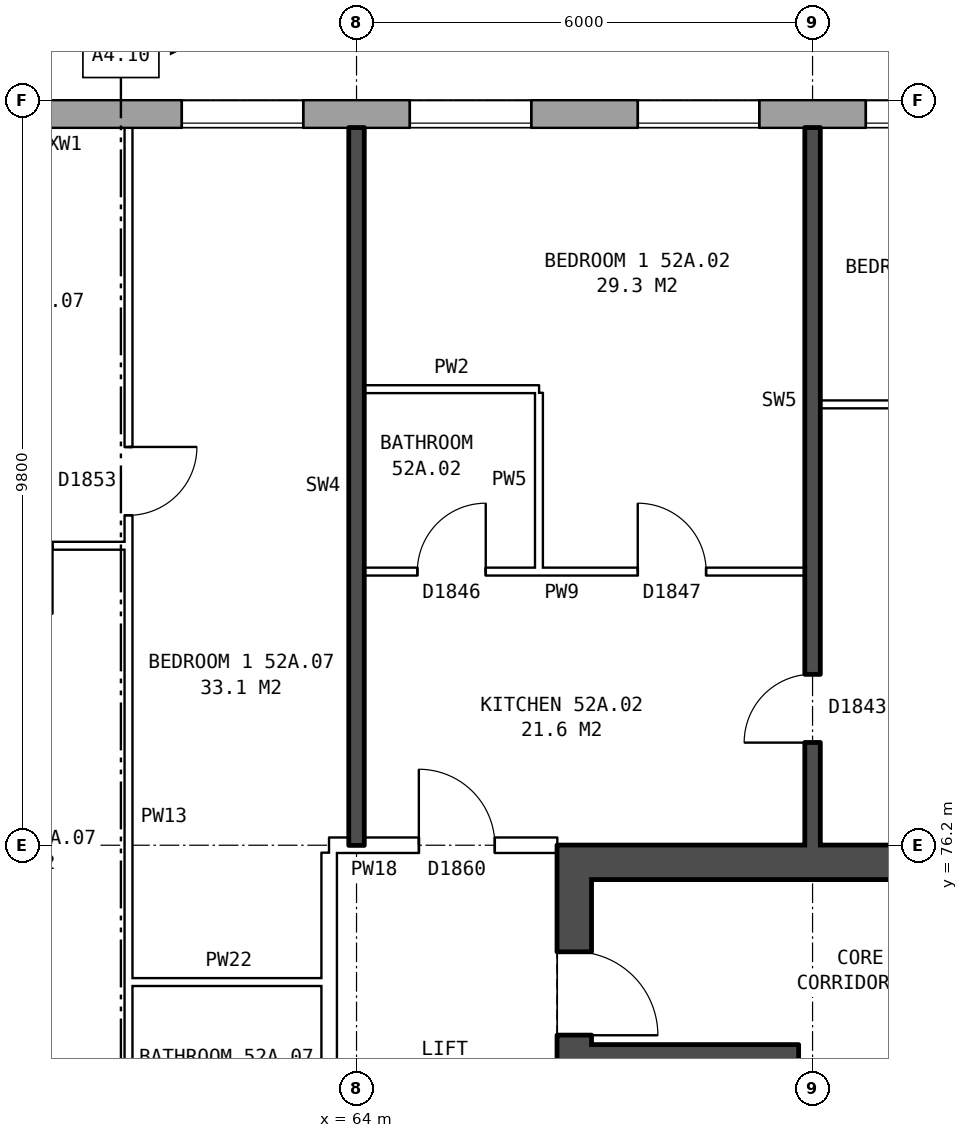
"""IFC4 building model, lengths in metres.
Left out: names, types, materials, properties, quantities, classifications, styles, units other than length and angle.
Written with IfcOpenShell. Run it as: python <this file> out.ifc"""

import sys

from ifc_helpers import new_model, si_unit, direction, frame, frame_2d, origin, place, context, subcontext, project, spatial, rectangle, extrude, element, fill, save


model = new_model("IFC4")
c1 = context("Model", 3, precision=1e-05, world=origin(), true_north=direction((0.0, 1.0)))
c2 = subcontext(c1, "Body", "Model", "MODEL_VIEW")
j1 = project(units=[si_unit("LENGTHUNIT", "METRE"), si_unit("PLANEANGLEUNIT", "RADIAN")], contexts=[c1])
p1 = place(None, origin())
s1 = spatial("IfcSite", under=j1, at=p1, CompositionType="ELEMENT")
p2 = place(p1, origin())
s2 = spatial("IfcBuilding", under=s1, at=p2, CompositionType="ELEMENT")
p3 = place(p2, frame((0.0, 0.0, 185.1)))
s3 = spatial("IfcBuildingStorey", under=s2, at=p3, CompositionType="ELEMENT", Elevation=185.1)
p4 = place(p3, frame((72.925, 85.82, 0.0), z_axis=(0.0, 0.0, 1.0), x_axis=(-1.0, 0.0, 0.0)))
e1 = element("IfcWall", 1, at=p4, inside=s3, PredefinedType="STANDARD", context=c2, shape_type="SweptSolid", body=[
    extrude(rectangle(XDim=39.601, YDim=0.36, at=frame_2d((19.8, 0.0))), origin(), (0.0, 0.0, 1.0), 2.85),
])
p5 = place(p4, frame((0.625, 0.0, 0.8)))
e2 = element("IfcOpeningElement", 2, at=p5, cuts=e1, PredefinedType="OPENING", context=c2, shape_type="SweptSolid", body=[
    extrude(rectangle(XDim=1.6, YDim=1.8, at=frame_2d((0.8, 0.9))), frame((0.0, 0.19, 0.0), z_axis=(0.0, -1.0, 0.0), x_axis=(1.0, 0.0, 0.0)), (0.0, 0.0, 1.0), 0.38),
])
p6 = place(p4, frame((3.625, 0.0, 0.8)))
e3 = element("IfcOpeningElement", 3, at=p6, cuts=e1, PredefinedType="OPENING", context=c2, shape_type="SweptSolid", body=[
    extrude(rectangle(XDim=1.6, YDim=1.8, at=frame_2d((0.8, 0.9))), frame((0.0, 0.19, 0.0), z_axis=(0.0, -1.0, 0.0), x_axis=(1.0, 0.0, 0.0)), (0.0, 0.0, 1.0), 0.38),
])
p7 = place(p4, frame((6.625, 0.0, 0.8)))
e4 = element("IfcOpeningElement", 4, at=p7, cuts=e1, PredefinedType="OPENING", context=c2, shape_type="SweptSolid", body=[
    extrude(rectangle(XDim=1.6, YDim=1.8, at=frame_2d((0.8, 0.9))), frame((0.0, 0.19, 0.0), z_axis=(0.0, -1.0, 0.0), x_axis=(1.0, 0.0, 0.0)), (0.0, 0.0, 1.0), 0.38),
])
p8 = place(p4, frame((9.625, 0.0, 0.8)))
e5 = element("IfcOpeningElement", 5, at=p8, cuts=e1, PredefinedType="OPENING", context=c2, shape_type="SweptSolid", body=[
    extrude(rectangle(XDim=1.6, YDim=1.8, at=frame_2d((0.8, 0.9))), frame((0.0, 0.19, 0.0), z_axis=(0.0, -1.0, 0.0), x_axis=(1.0, 0.0, 0.0)), (0.0, 0.0, 1.0), 0.38),
])
p9 = place(p4, frame((13.525, 0.0, 0.65)))
e6 = element("IfcOpeningElement", 6, at=p9, cuts=e1, PredefinedType="OPENING", context=c2, shape_type="SweptSolid", body=[
    extrude(rectangle(XDim=1.2, YDim=1.5, at=frame_2d((0.6, 0.75))), frame((0.0, 0.19, 0.0), z_axis=(0.0, -1.0, 0.0), x_axis=(1.0, 0.0, 0.0)), (0.0, 0.0, 1.0), 0.38),
])
p10 = place(p4, frame((15.625, 0.0, 0.8)))
e7 = element("IfcOpeningElement", 7, at=p10, cuts=e1, PredefinedType="OPENING", context=c2, shape_type="SweptSolid", body=[
    extrude(rectangle(XDim=1.6, YDim=1.8, at=frame_2d((0.8, 0.9))), frame((0.0, 0.19, 0.0), z_axis=(0.0, -1.0, 0.0), x_axis=(1.0, 0.0, 0.0)), (0.0, 0.0, 1.0), 0.38),
])
p11 = place(p4, frame((18.625, 0.0, 0.8)))
e8 = element("IfcOpeningElement", 8, at=p11, cuts=e1, PredefinedType="OPENING", context=c2, shape_type="SweptSolid", body=[
    extrude(rectangle(XDim=1.6, YDim=1.8, at=frame_2d((0.8, 0.9))), frame((0.0, 0.19, 0.0), z_axis=(0.0, -1.0, 0.0), x_axis=(1.0, 0.0, 0.0)), (0.0, 0.0, 1.0), 0.38),
])
p12 = place(p4, frame((21.625, 0.0, 0.8)))
e9 = element("IfcOpeningElement", 9, at=p12, cuts=e1, PredefinedType="OPENING", context=c2, shape_type="SweptSolid", body=[
    extrude(rectangle(XDim=1.6, YDim=1.8, at=frame_2d((0.8, 0.9))), frame((0.0, 0.19, 0.0), z_axis=(0.0, -1.0, 0.0), x_axis=(1.0, 0.0, 0.0)), (0.0, 0.0, 1.0), 0.38),
])
p13 = place(p4, frame((24.075, 0.0, 0.8)))
e10 = element("IfcOpeningElement", 10, at=p13, cuts=e1, PredefinedType="OPENING", context=c2, shape_type="SweptSolid", body=[
    extrude(rectangle(XDim=1.4, YDim=1.8, at=frame_2d((0.7, 0.9))), frame((0.0, 0.19, 0.0), z_axis=(0.0, -1.0, 0.0), x_axis=(1.0, 0.0, 0.0)), (0.0, 0.0, 1.0), 0.38),
])
p14 = place(p4, frame((27.625, 0.0, 1.7)))
e11 = element("IfcOpeningElement", 11, at=p14, cuts=e1, PredefinedType="OPENING", context=c2, shape_type="SweptSolid", body=[
    extrude(rectangle(XDim=0.8, YDim=0.9, at=frame_2d((0.4, 0.45))), frame((0.0, 0.19, 0.0), z_axis=(0.0, -1.0, 0.0), x_axis=(1.0, 0.0, 0.0)), (0.0, 0.0, 1.0), 0.38),
])
p15 = place(p4, frame((30.625, 0.0, 0.8)))
e12 = element("IfcOpeningElement", 12, at=p15, cuts=e1, PredefinedType="OPENING", context=c2, shape_type="SweptSolid", body=[
    extrude(rectangle(XDim=1.6, YDim=1.8, at=frame_2d((0.8, 0.9))), frame((0.0, 0.19, 0.0), z_axis=(0.0, -1.0, 0.0), x_axis=(1.0, 0.0, 0.0)), (0.0, 0.0, 1.0), 0.38),
])
p16 = place(p4, frame((33.625, 0.0, 0.8)))
e13 = element("IfcOpeningElement", 13, at=p16, cuts=e1, PredefinedType="OPENING", context=c2, shape_type="SweptSolid", body=[
    extrude(rectangle(XDim=1.6, YDim=1.8, at=frame_2d((0.8, 0.9))), frame((0.0, 0.19, 0.0), z_axis=(0.0, -1.0, 0.0), x_axis=(1.0, 0.0, 0.0)), (0.0, 0.0, 1.0), 0.38),
])
p17 = place(p4, frame((36.625, 0.0, 0.8)))
e14 = element("IfcOpeningElement", 14, at=p17, cuts=e1, PredefinedType="OPENING", context=c2, shape_type="SweptSolid", body=[
    extrude(rectangle(XDim=1.6, YDim=1.8, at=frame_2d((0.8, 0.9))), frame((0.0, 0.19, 0.0), z_axis=(0.0, -1.0, 0.0), x_axis=(1.0, 0.0, 0.0)), (0.0, 0.0, 1.0), 0.38),
])
p18 = place(p4, frame((25.775, 0.0, 0.8)))
e15 = element("IfcOpeningElement", 15, at=p18, cuts=e1, PredefinedType="OPENING", context=c2, shape_type="SweptSolid", body=[
    extrude(rectangle(XDim=0.6, YDim=0.9, at=frame_2d((0.3, 0.45))), frame((0.0, 0.19, 0.0), z_axis=(0.0, -1.0, 0.0), x_axis=(1.0, 0.0, 0.0)), (0.0, 0.0, 1.0), 0.38),
])
p19 = place(p4, frame((28.725, 0.0, 0.8)))
e16 = element("IfcOpeningElement", 16, at=p19, cuts=e1, PredefinedType="OPENING", context=c2, shape_type="SweptSolid", body=[
    extrude(rectangle(XDim=1.6, YDim=1.8, at=frame_2d((0.8, 0.9))), frame((0.0, 0.19, 0.0), z_axis=(0.0, -1.0, 0.0), x_axis=(1.0, 0.0, 0.0)), (0.0, 0.0, 1.0), 0.38),
])
p20 = place(p3, frame((66.865, 63.8, 0.0), z_axis=(0.0, 0.0, 1.0), x_axis=(0.0, 1.0, 0.0)))
e17 = element("IfcWall", 17, at=p20, inside=s3, PredefinedType="SHEAR", context=c2, shape_type="SweptSolid", body=[
    extrude(rectangle(XDim=12.4, YDim=0.45, at=frame_2d((6.2, 0.0))), origin(), (0.0, 0.0, 1.0), 2.85),
])
p21 = place(p20, frame((1.325, 0.0, 0.0)))
e18 = element("IfcOpeningElement", 18, at=p21, cuts=e17, PredefinedType="OPENING", context=c2, shape_type="SweptSolid", body=[
    extrude(rectangle(XDim=1.1, YDim=2.1, at=frame_2d((0.55, 1.05))), frame((0.0, 0.235, 0.0), z_axis=(0.0, -1.0, 0.0), x_axis=(1.0, 0.0, 0.0)), (0.0, 0.0, 1.0), 0.47),
])
p22 = place(p20, frame((3.6, 0.0, 0.0)))
e19 = element("IfcOpeningElement", 19, at=p22, cuts=e17, PredefinedType="OPENING", context=c2, shape_type="SweptSolid", body=[
    extrude(rectangle(XDim=1.1, YDim=2.1, at=frame_2d((0.55, 1.05))), frame((0.0, 0.235, 0.0), z_axis=(0.0, -1.0, 0.0), x_axis=(1.0, 0.0, 0.0)), (0.0, 0.0, 1.0), 0.47),
])
p23 = place(p20, frame((5.8, 0.0, 0.0)))
e20 = element("IfcOpeningElement", 20, at=p23, cuts=e17, PredefinedType="OPENING", context=c2, shape_type="SweptSolid", body=[
    extrude(rectangle(XDim=1.1, YDim=2.1, at=frame_2d((0.55, 1.05))), frame((0.0, 0.235, 0.0), z_axis=(0.0, -1.0, 0.0), x_axis=(1.0, 0.0, 0.0)), (0.0, 0.0, 1.0), 0.47),
])
p24 = place(p20, frame((8.0, 0.0, 0.0)))
e21 = element("IfcOpeningElement", 21, at=p24, cuts=e17, PredefinedType="OPENING", context=c2, shape_type="SweptSolid", body=[
    extrude(rectangle(XDim=1.1, YDim=2.1, at=frame_2d((0.55, 1.05))), frame((0.0, 0.235, 0.0), z_axis=(0.0, -1.0, 0.0), x_axis=(1.0, 0.0, 0.0)), (0.0, 0.0, 1.0), 0.47),
])
p25 = place(p20, frame((9.9, 0.0, 0.0)))
e22 = element("IfcOpeningElement", 22, at=p25, cuts=e17, PredefinedType="OPENING", context=c2, shape_type="SweptSolid", body=[
    extrude(rectangle(XDim=1.1, YDim=2.1, at=frame_2d((0.55, 1.05))), frame((0.0, 0.235, 0.0), z_axis=(0.0, -1.0, 0.0), x_axis=(1.0, 0.0, 0.0)), (0.0, 0.0, 1.0), 0.47),
])
p26 = place(p3, frame((67.09, 75.975, 0.0), z_axis=(0.0, 0.0, 1.0), x_axis=(1.0, 0.0, 0.0)))
e23 = element("IfcWall", 23, at=p26, inside=s3, PredefinedType="SHEAR", context=c2, shape_type="SweptSolid", body=[
    extrude(rectangle(XDim=8.1, YDim=0.45, at=frame_2d((4.05, 0.0))), origin(), (0.0, 0.0, 1.0), 2.85),
])
p27 = place(p3, frame((67.09, 73.45, 0.0), z_axis=(0.0, 0.0, 1.0), x_axis=(1.0, 0.0, 0.0)))
e24 = element("IfcWall", 24, at=p27, inside=s3, PredefinedType="SHEAR", context=c2, shape_type="SweptSolid", body=[
    extrude(rectangle(XDim=2.475, YDim=0.25, at=frame_2d((1.237, 0.0))), origin(), (0.0, 0.0, 1.0), 2.85),
])
p28 = place(p3, frame((69.69, 66.975, 0.0), z_axis=(0.0, 0.0, 1.0), x_axis=(0.0, 1.0, 0.0)))
e25 = element("IfcWall", 25, at=p28, inside=s3, PredefinedType="SHEAR", context=c2, shape_type="SweptSolid", body=[
    extrude(rectangle(XDim=6.6, YDim=0.25, at=frame_2d((3.3, 0.0))), origin(), (0.0, 0.0, 1.0), 2.85),
])
p29 = place(p3, frame((63.64, 63.9, 0.0), z_axis=(0.0, 0.0, 1.0), x_axis=(0.0, 1.0, 0.0)))
e26 = element("IfcWall", 26, at=p29, inside=s3, PredefinedType="PARTITIONING", context=c2, shape_type="SweptSolid", body=[
    extrude(rectangle(XDim=12.2, YDim=0.2, at=frame_2d((6.1, 0.0))), origin(), (0.0, 0.0, 1.0), 2.85),
])
p30 = place(p29, frame((5.1, 0.0, 0.0)))
e27 = element("IfcOpeningElement", 27, at=p30, cuts=e26, PredefinedType="OPENING", context=c2, shape_type="SweptSolid", body=[
    extrude(rectangle(XDim=2.0, YDim=2.1, at=frame_2d((1.0, 1.05))), frame((0.0, 0.11, 0.0), z_axis=(0.0, -1.0, 0.0), x_axis=(1.0, 0.0, 0.0)), (0.0, 0.0, 1.0), 0.22),
])
p31 = place(p3, frame((61.0, 74.4, 0.0), z_axis=(0.0, 0.0, 1.0), x_axis=(1.0, 0.0, 0.0)))
e28 = element("IfcWall", 28, at=p31, inside=s3, PredefinedType="PARTITIONING", context=c2, shape_type="SweptSolid", body=[
    extrude(rectangle(XDim=2.64, YDim=0.1, at=frame_2d((1.32, 0.0))), origin(), (0.0, 0.0, 1.0), 2.85),
])
p32 = place(p3, frame((63.64, 76.2, 0.0), z_axis=(0.0, 0.0, 1.0), x_axis=(1.0, 0.0, 0.0)))
e29 = element("IfcWall", 29, at=p32, inside=s3, PredefinedType="PARTITIONING", context=c2, shape_type="SweptSolid", body=[
    extrude(rectangle(XDim=3.0, YDim=0.2, at=frame_2d((1.5, 0.0))), origin(), (0.0, 0.0, 1.0), 2.85),
])
p33 = place(p32, frame((1.18, 0.0, 0.0)))
e30 = element("IfcOpeningElement", 30, at=p33, cuts=e29, PredefinedType="OPENING", context=c2, shape_type="SweptSolid", body=[
    extrude(rectangle(XDim=1.0, YDim=2.1, at=frame_2d((0.5, 1.05))), frame((0.0, 0.11, 0.0), z_axis=(0.0, -1.0, 0.0), x_axis=(1.0, 0.0, 0.0)), (0.0, 0.0, 1.0), 0.22),
])
p34 = place(p3, frame((64.1, 79.8, 0.0), z_axis=(0.0, 0.0, 1.0), x_axis=(1.0, 0.0, 0.0)))
e31 = element("IfcWall", 31, at=p34, inside=s3, PredefinedType="PARTITIONING", context=c2, shape_type="SweptSolid", body=[
    extrude(rectangle(XDim=5.8, YDim=0.1, at=frame_2d((2.9, 0.0))), origin(), (0.0, 0.0, 1.0), 2.85),
])
p35 = place(p34, frame((3.6, 0.0, 0.0)))
e32 = element("IfcOpeningElement", 32, at=p35, cuts=e31, PredefinedType="OPENING", context=c2, shape_type="SweptSolid", body=[
    extrude(rectangle(XDim=0.9, YDim=2.1, at=frame_2d((0.45, 1.05))), frame((0.0, 0.06, 0.0), z_axis=(0.0, -1.0, 0.0), x_axis=(1.0, 0.0, 0.0)), (0.0, 0.0, 1.0), 0.12),
])
p36 = place(p34, frame((0.7, 0.0, 0.0)))
e33 = element("IfcOpeningElement", 33, at=p36, cuts=e31, PredefinedType="OPENING", context=c2, shape_type="SweptSolid", body=[
    extrude(rectangle(XDim=0.9, YDim=2.1, at=frame_2d((0.45, 1.05))), frame((0.0, 0.06, 0.0), z_axis=(0.0, -1.0, 0.0), x_axis=(1.0, 0.0, 0.0)), (0.0, 0.0, 1.0), 0.12),
])
p37 = place(p3, frame((58.1, 80.14, 0.0), z_axis=(0.0, 0.0, 1.0), x_axis=(1.0, 0.0, 0.0)))
e34 = element("IfcWall", 34, at=p37, inside=s3, PredefinedType="PARTITIONING", context=c2, shape_type="SweptSolid", body=[
    extrude(rectangle(XDim=2.9, YDim=0.1, at=frame_2d((1.45, 0.0))), origin(), (0.0, 0.0, 1.0), 2.85),
])
p38 = place(p37, frame((1.0, 0.0, 0.0)))
e35 = element("IfcOpeningElement", 35, at=p38, cuts=e34, PredefinedType="OPENING", context=c2, shape_type="SweptSolid", body=[
    extrude(rectangle(XDim=0.9, YDim=2.1, at=frame_2d((0.45, 1.05))), frame((0.0, 0.06, 0.0), z_axis=(0.0, -1.0, 0.0), x_axis=(1.0, 0.0, 0.0)), (0.0, 0.0, 1.0), 0.12),
])
p39 = place(p3, frame((70.1, 82.0, 0.0), z_axis=(0.0, 0.0, 1.0), x_axis=(1.0, 0.0, 0.0)))
e36 = element("IfcWall", 36, at=p39, inside=s3, PredefinedType="PARTITIONING", context=c2, shape_type="SweptSolid", body=[
    extrude(rectangle(XDim=5.54, YDim=0.1, at=frame_2d((2.77, 0.0))), origin(), (0.0, 0.0, 1.0), 2.85),
])
p40 = place(p39, frame((2.32, 0.0, 0.0)))
e37 = element("IfcOpeningElement", 37, at=p40, cuts=e36, PredefinedType="OPENING", context=c2, shape_type="SweptSolid", body=[
    extrude(rectangle(XDim=0.9, YDim=2.1, at=frame_2d((0.45, 1.05))), frame((0.0, 0.06, 0.0), z_axis=(0.0, -1.0, 0.0), x_axis=(1.0, 0.0, 0.0)), (0.0, 0.0, 1.0), 0.12),
])
p41 = place(p3, frame((64.1, 82.2, 0.0), z_axis=(0.0, 0.0, 1.0), x_axis=(1.0, 0.0, 0.0)))
e38 = element("IfcWall", 38, at=p41, inside=s3, PredefinedType="PARTITIONING", context=c2, shape_type="SweptSolid", body=[
    extrude(rectangle(XDim=2.3, YDim=0.1, at=frame_2d((1.15, 0.0))), origin(), (0.0, 0.0, 1.0), 2.85),
])
p42 = place(p3, frame((61.0, 71.3, 0.0), z_axis=(0.0, 0.0, 1.0), x_axis=(0.0, 1.0, 0.0)))
e39 = element("IfcWall", 39, at=p42, inside=s3, PredefinedType="PARTITIONING", context=c2, shape_type="SweptSolid", body=[
    extrude(rectangle(XDim=14.34, YDim=0.1, at=frame_2d((7.17, 0.0))), origin(), (0.0, 0.0, 1.0), 2.85),
])
p43 = place(p42, frame((9.24, 0.0, 0.0)))
e40 = element("IfcOpeningElement", 40, at=p43, cuts=e39, PredefinedType="OPENING", context=c2, shape_type="SweptSolid", body=[
    extrude(rectangle(XDim=0.9, YDim=2.1, at=frame_2d((0.45, 1.05))), frame((0.0, 0.06, 0.0), z_axis=(0.0, -1.0, 0.0), x_axis=(1.0, 0.0, 0.0)), (0.0, 0.0, 1.0), 0.12),
])
p44 = place(p42, frame((0.4, 0.0, 0.0)))
e41 = element("IfcOpeningElement", 41, at=p44, cuts=e39, PredefinedType="OPENING", context=c2, shape_type="SweptSolid", body=[
    extrude(rectangle(XDim=0.9, YDim=2.1, at=frame_2d((0.45, 1.05))), frame((0.0, 0.06, 0.0), z_axis=(0.0, -1.0, 0.0), x_axis=(1.0, 0.0, 0.0)), (0.0, 0.0, 1.0), 0.12),
])
p45 = place(p3, frame((64.0, 76.2, 0.0), z_axis=(0.0, 0.0, 1.0), x_axis=(0.0, 1.0, 0.0)))
e42 = element("IfcWall", 42, at=p45, inside=s3, PredefinedType="SOLIDWALL", context=c2, shape_type="SweptSolid", body=[
    extrude(rectangle(XDim=9.44, YDim=0.2, at=frame_2d((4.72, 0.0))), origin(), (0.0, 0.0, 1.0), 2.85),
])
p46 = place(p3, frame((66.4, 79.85, 0.0), z_axis=(0.0, 0.0, 1.0), x_axis=(0.0, 1.0, 0.0)))
e43 = element("IfcWall", 43, at=p46, inside=s3, PredefinedType="PARTITIONING", context=c2, shape_type="SweptSolid", body=[
    extrude(rectangle(XDim=2.3, YDim=0.1, at=frame_2d((1.15, 0.0))), origin(), (0.0, 0.0, 1.0), 2.85),
])
p47 = place(p3, frame((70.0, 76.2, 0.0), z_axis=(0.0, 0.0, 1.0), x_axis=(0.0, 1.0, 0.0)))
e44 = element("IfcWall", 44, at=p47, inside=s3, PredefinedType="SOLIDWALL", context=c2, shape_type="SweptSolid", body=[
    extrude(rectangle(XDim=9.44, YDim=0.2, at=frame_2d((4.72, 0.0))), origin(), (0.0, 0.0, 1.0), 2.85),
])
p48 = place(p47, frame((1.35, 0.0, 0.0)))
e45 = element("IfcOpeningElement", 45, at=p48, cuts=e44, PredefinedType="OPENING", context=c2, shape_type="SweptSolid", body=[
    extrude(rectangle(XDim=0.9, YDim=2.1, at=frame_2d((0.45, 1.05))), frame((0.0, 0.11, 0.0), z_axis=(0.0, -1.0, 0.0), x_axis=(1.0, 0.0, 0.0)), (0.0, 0.0, 1.0), 0.22),
])
p49 = place(p5, origin())
e46 = element("IfcWindow", 46, at=p49, inside=s3, PartitioningType="SINGLE_PANEL", PredefinedType="WINDOW", context=c2, shape_type="SweptSolid", body=[
    extrude(rectangle(XDim=1.6, YDim=1.8, at=frame_2d((0.8, 0.9))), frame((0.0, 0.15, 0.0), z_axis=(0.0, -1.0, 0.0), x_axis=(1.0, 0.0, 0.0)), (0.0, 0.0, 1.0), 0.06),
])
fill(e2, e46)
p50 = place(p6, origin())
e47 = element("IfcWindow", 47, at=p50, inside=s3, PartitioningType="SINGLE_PANEL", PredefinedType="WINDOW", context=c2, shape_type="SweptSolid", body=[
    extrude(rectangle(XDim=1.6, YDim=1.8, at=frame_2d((0.8, 0.9))), frame((0.0, 0.15, 0.0), z_axis=(0.0, -1.0, 0.0), x_axis=(1.0, 0.0, 0.0)), (0.0, 0.0, 1.0), 0.06),
])
fill(e3, e47)
p51 = place(p7, origin())
e48 = element("IfcWindow", 48, at=p51, inside=s3, PartitioningType="SINGLE_PANEL", PredefinedType="WINDOW", context=c2, shape_type="SweptSolid", body=[
    extrude(rectangle(XDim=1.6, YDim=1.8, at=frame_2d((0.8, 0.9))), frame((0.0, 0.15, 0.0), z_axis=(0.0, -1.0, 0.0), x_axis=(1.0, 0.0, 0.0)), (0.0, 0.0, 1.0), 0.06),
])
fill(e4, e48)
p52 = place(p8, origin())
e49 = element("IfcWindow", 49, at=p52, inside=s3, PartitioningType="SINGLE_PANEL", PredefinedType="WINDOW", context=c2, shape_type="SweptSolid", body=[
    extrude(rectangle(XDim=1.6, YDim=1.8, at=frame_2d((0.8, 0.9))), frame((0.0, 0.15, 0.0), z_axis=(0.0, -1.0, 0.0), x_axis=(1.0, 0.0, 0.0)), (0.0, 0.0, 1.0), 0.06),
])
fill(e5, e49)
p53 = place(p25, frame((1.1, 0.0, 0.0), z_axis=(0.0, 0.0, 1.0), x_axis=(-1.0, 0.0, 0.0)))
e50 = element("IfcDoor", 50, at=p53, inside=s3, OperationType="SINGLE_SWING_RIGHT", PredefinedType="DOOR", context=c2, shape_type="SweptSolid", body=[
    extrude(rectangle(XDim=1.1, YDim=2.1, at=frame_2d((0.55, 1.05))), frame((0.0, 0.21, 0.0), z_axis=(0.0, -1.0, 0.0), x_axis=(1.0, 0.0, 0.0)), (0.0, 0.0, 1.0), 0.05),
])
fill(e22, e50)
p54 = place(p35, origin())
e51 = element("IfcDoor", 51, at=p54, inside=s3, OperationType="SINGLE_SWING_LEFT", PredefinedType="DOOR", context=c2, shape_type="SweptSolid", body=[
    extrude(rectangle(XDim=0.9, YDim=2.1, at=frame_2d((0.45, 1.05))), frame((0.0, 0.025, 0.0), z_axis=(0.0, -1.0, 0.0), x_axis=(1.0, 0.0, 0.0)), (0.0, 0.0, 1.0), 0.05),
])
fill(e32, e51)
p55 = place(p33, origin())
e52 = element("IfcDoor", 52, at=p55, inside=s3, OperationType="SINGLE_SWING_LEFT", PredefinedType="DOOR", context=c2, shape_type="SweptSolid", body=[
    extrude(rectangle(XDim=1.0, YDim=2.1, at=frame_2d((0.5, 1.05))), frame((0.0, 0.025, 0.0), z_axis=(0.0, -1.0, 0.0), x_axis=(1.0, 0.0, 0.0)), (0.0, 0.0, 1.0), 0.05),
])
fill(e30, e52)
p56 = place(p48, origin())
e53 = element("IfcDoor", 53, at=p56, inside=s3, OperationType="SINGLE_SWING_LEFT", PredefinedType="DOOR", context=c2, shape_type="SweptSolid", body=[
    extrude(rectangle(XDim=0.9, YDim=2.1, at=frame_2d((0.45, 1.05))), frame((0.0, 0.025, 0.0), z_axis=(0.0, -1.0, 0.0), x_axis=(1.0, 0.0, 0.0)), (0.0, 0.0, 1.0), 0.05),
])
fill(e45, e53)
p57 = place(p36, origin())
e54 = element("IfcDoor", 54, at=p57, inside=s3, OperationType="SINGLE_SWING_RIGHT", PredefinedType="DOOR", context=c2, shape_type="SweptSolid", body=[
    extrude(rectangle(XDim=0.9, YDim=2.1, at=frame_2d((0.45, 1.05))), frame((0.0, 0.025, 0.0), z_axis=(0.0, -1.0, 0.0), x_axis=(1.0, 0.0, 0.0)), (0.0, 0.0, 1.0), 0.05),
])
fill(e33, e54)
p58 = place(p43, frame((0.9, 0.0, 0.0), z_axis=(0.0, 0.0, 1.0), x_axis=(-1.0, 0.0, 0.0)))
e55 = element("IfcDoor", 55, at=p58, inside=s3, OperationType="SINGLE_SWING_LEFT", PredefinedType="DOOR", context=c2, shape_type="SweptSolid", body=[
    extrude(rectangle(XDim=0.9, YDim=2.1, at=frame_2d((0.45, 1.05))), frame((0.0, 0.025, 0.0), z_axis=(0.0, -1.0, 0.0), x_axis=(1.0, 0.0, 0.0)), (0.0, 0.0, 1.0), 0.05),
])
fill(e40, e55)
save(model, sys.argv[1])
